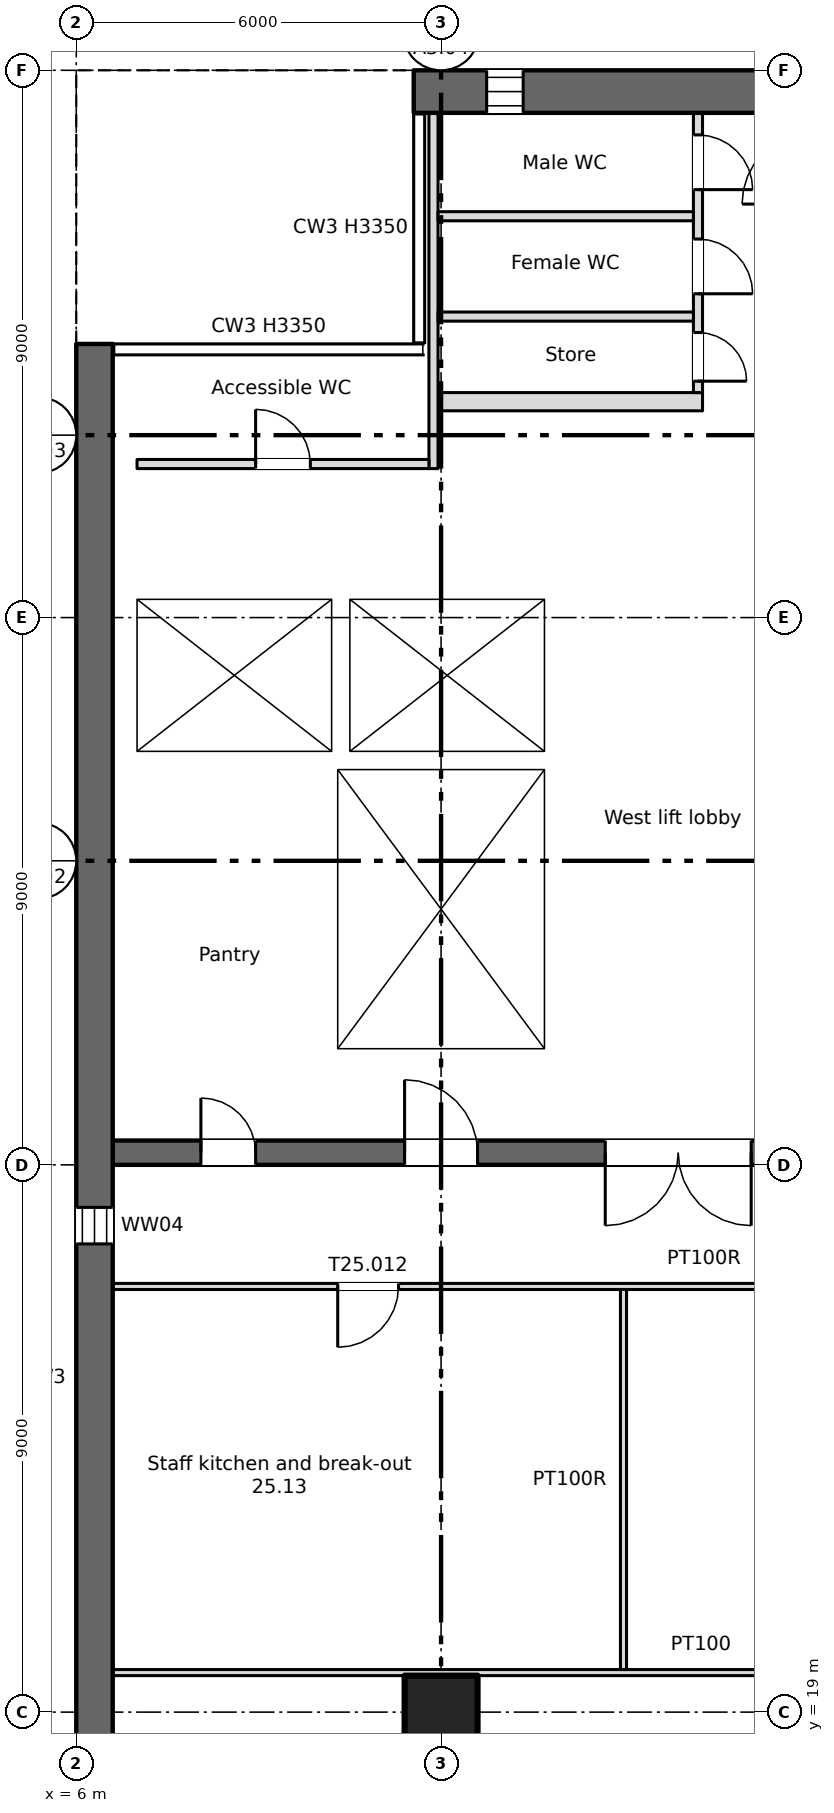
"""IFC4 building model, lengths in metres.
Left out: names, types, materials, properties, quantities, classifications, styles, units other than length and angle.
Written with IfcOpenShell. Run it as: python <this file> out.ifc"""

import sys

from ifc_helpers import new_model, si_unit, direction, frame, frame_2d, origin, origin_2d, place, context, subcontext, project, spatial, rectangle, extrude, element, fill, save


model = new_model("IFC4")
c1 = context("Model", 3, precision=1e-05, world=origin(), true_north=direction((0.0, 1.0)))
c2 = subcontext(c1, "Body", "Model", "MODEL_VIEW")
j1 = project(units=[si_unit("LENGTHUNIT", "METRE"), si_unit("PLANEANGLEUNIT", "RADIAN")], contexts=[c1])
p1 = place(None, origin())
s1 = spatial("IfcSite", under=j1, at=p1, CompositionType="ELEMENT")
p2 = place(p1, origin())
s2 = spatial("IfcBuilding", under=s1, at=p2, CompositionType="ELEMENT")
p3 = place(p2, frame((0.0, 0.0, 170.5)))
s3 = spatial("IfcBuildingStorey", under=s2, at=p3, CompositionType="ELEMENT", Elevation=170.5)
p4 = place(p3, frame((12.0, 19.0, 0.0), z_axis=(0.0, 0.0, 1.0), x_axis=(1.0, 0.0, 0.0)))
e1 = element("IfcColumn", 1, at=p4, inside=s3, PredefinedType="COLUMN", context=c2, shape_type="SweptSolid", body=[
    extrude(rectangle(XDim=1.2, YDim=1.2, at=origin_2d()), origin(), (0.0, 0.0, 1.0), 3.35),
])
p5 = place(p3, frame((6.3, 7.5, 0.0), z_axis=(0.0, 0.0, 1.0), x_axis=(0.0, 1.0, 0.0)))
e2 = element("IfcWall", 2, at=p5, inside=s3, PredefinedType="SHEAR", context=c2, shape_type="SweptSolid", body=[
    extrude(rectangle(XDim=34.0, YDim=0.6, at=frame_2d((17.0, 0.0))), origin(), (0.0, 0.0, 1.0), 3.35),
])
p6 = place(p5, frame((1.2, 0.0, 0.6)))
e3 = element("IfcOpeningElement", 3, at=p6, cuts=e2, PredefinedType="OPENING", context=c2, shape_type="SweptSolid", body=[
    extrude(rectangle(XDim=0.6, YDim=2.4, at=frame_2d((0.3, 1.2))), frame((0.0, 0.31, 0.0), z_axis=(0.0, -1.0, 0.0), x_axis=(1.0, 0.0, 0.0)), (0.0, 0.0, 1.0), 0.62),
])
p7 = place(p5, frame((7.2, 0.0, 0.6)))
e4 = element("IfcOpeningElement", 4, at=p7, cuts=e2, PredefinedType="OPENING", context=c2, shape_type="SweptSolid", body=[
    extrude(rectangle(XDim=0.6, YDim=2.4, at=frame_2d((0.3, 1.2))), frame((0.0, 0.31, 0.0), z_axis=(0.0, -1.0, 0.0), x_axis=(1.0, 0.0, 0.0)), (0.0, 0.0, 1.0), 0.62),
])
p8 = place(p5, frame((19.2, 0.0, 0.6)))
e5 = element("IfcOpeningElement", 5, at=p8, cuts=e2, PredefinedType="OPENING", context=c2, shape_type="SweptSolid", body=[
    extrude(rectangle(XDim=0.6, YDim=2.4, at=frame_2d((0.3, 1.2))), frame((0.0, 0.31, 0.0), z_axis=(0.0, -1.0, 0.0), x_axis=(1.0, 0.0, 0.0)), (0.0, 0.0, 1.0), 0.62),
])
p9 = place(p3, frame((11.55, 45.65, 0.0), z_axis=(0.0, 0.0, 1.0), x_axis=(1.0, 0.0, 0.0)))
e6 = element("IfcWall", 6, at=p9, inside=s3, PredefinedType="SHEAR", context=c2, shape_type="SweptSolid", body=[
    extrude(rectangle(XDim=54.9, YDim=0.7, at=frame_2d((27.45, 0.0))), origin(), (0.0, 0.0, 1.0), 3.35),
])
p10 = place(p9, frame((1.2, 0.0, 0.6)))
e7 = element("IfcOpeningElement", 7, at=p10, cuts=e6, PredefinedType="OPENING", context=c2, shape_type="SweptSolid", body=[
    extrude(rectangle(XDim=0.6, YDim=2.4, at=frame_2d((0.3, 1.2))), frame((0.0, 0.36, 0.0), z_axis=(0.0, -1.0, 0.0), x_axis=(1.0, 0.0, 0.0)), (0.0, 0.0, 1.0), 0.72),
])
p11 = place(p3, frame((6.6, 28.2, 0.0), z_axis=(0.0, 0.0, 1.0), x_axis=(1.0, 0.0, 0.0)))
e8 = element("IfcWall", 8, at=p11, inside=s3, PredefinedType="SHEAR", context=c2, shape_type="SweptSolid", body=[
    extrude(rectangle(XDim=57.9, YDim=0.4, at=frame_2d((28.95, 0.0))), origin(), (0.0, 0.0, 1.0), 3.35),
])
p12 = place(p11, frame((12.163, 0.0, 0.0)))
e9 = element("IfcOpeningElement", 9, at=p12, cuts=e8, PredefinedType="OPENING", context=c2, shape_type="SweptSolid", body=[
    extrude(rectangle(XDim=0.9, YDim=2.1, at=frame_2d((0.45, 1.05))), frame((0.0, 0.21, 0.0), z_axis=(0.0, -1.0, 0.0), x_axis=(1.0, 0.0, 0.0)), (0.0, 0.0, 1.0), 0.42),
])
p13 = place(p11, frame((14.738, 0.0, 0.0)))
e10 = element("IfcOpeningElement", 10, at=p13, cuts=e8, PredefinedType="OPENING", context=c2, shape_type="SweptSolid", body=[
    extrude(rectangle(XDim=0.9, YDim=2.1, at=frame_2d((0.45, 1.05))), frame((0.0, 0.21, 0.0), z_axis=(0.0, -1.0, 0.0), x_axis=(1.0, 0.0, 0.0)), (0.0, 0.0, 1.0), 0.42),
])
p14 = place(p11, frame((49.163, 0.0, 0.0)))
e11 = element("IfcOpeningElement", 11, at=p14, cuts=e8, PredefinedType="OPENING", context=c2, shape_type="SweptSolid", body=[
    extrude(rectangle(XDim=0.9, YDim=2.1, at=frame_2d((0.45, 1.05))), frame((0.0, 0.21, 0.0), z_axis=(0.0, -1.0, 0.0), x_axis=(1.0, 0.0, 0.0)), (0.0, 0.0, 1.0), 0.42),
])
p15 = place(p11, frame((51.738, 0.0, 0.0)))
e12 = element("IfcOpeningElement", 12, at=p15, cuts=e8, PredefinedType="OPENING", context=c2, shape_type="SweptSolid", body=[
    extrude(rectangle(XDim=0.9, YDim=2.1, at=frame_2d((0.45, 1.05))), frame((0.0, 0.21, 0.0), z_axis=(0.0, -1.0, 0.0), x_axis=(1.0, 0.0, 0.0)), (0.0, 0.0, 1.0), 0.42),
])
p16 = place(p11, frame((1.45, 0.0, 0.0)))
e13 = element("IfcOpeningElement", 13, at=p16, cuts=e8, PredefinedType="OPENING", context=c2, shape_type="SweptSolid", body=[
    extrude(rectangle(XDim=0.9, YDim=2.1, at=frame_2d((0.45, 1.05))), frame((0.0, 0.21, 0.0), z_axis=(0.0, -1.0, 0.0), x_axis=(1.0, 0.0, 0.0)), (0.0, 0.0, 1.0), 0.42),
])
p17 = place(p11, frame((4.8, 0.0, 0.0)))
e14 = element("IfcOpeningElement", 14, at=p17, cuts=e8, PredefinedType="OPENING", context=c2, shape_type="SweptSolid", body=[
    extrude(rectangle(XDim=1.2, YDim=2.1, at=frame_2d((0.6, 1.05))), frame((0.0, 0.21, 0.0), z_axis=(0.0, -1.0, 0.0), x_axis=(1.0, 0.0, 0.0)), (0.0, 0.0, 1.0), 0.42),
])
p18 = place(p11, frame((31.8, 0.0, 0.0)))
e15 = element("IfcOpeningElement", 15, at=p18, cuts=e8, PredefinedType="OPENING", context=c2, shape_type="SweptSolid", body=[
    extrude(rectangle(XDim=1.2, YDim=2.1, at=frame_2d((0.6, 1.05))), frame((0.0, 0.21, 0.0), z_axis=(0.0, -1.0, 0.0), x_axis=(1.0, 0.0, 0.0)), (0.0, 0.0, 1.0), 0.42),
])
p19 = place(p11, frame((55.3, 0.0, 0.0)))
e16 = element("IfcOpeningElement", 16, at=p19, cuts=e8, PredefinedType="OPENING", context=c2, shape_type="SweptSolid", body=[
    extrude(rectangle(XDim=1.2, YDim=2.1, at=frame_2d((0.6, 1.05))), frame((0.0, 0.21, 0.0), z_axis=(0.0, -1.0, 0.0), x_axis=(1.0, 0.0, 0.0)), (0.0, 0.0, 1.0), 0.42),
])
p20 = place(p11, frame((21.8, 0.0, 0.0)))
e17 = element("IfcOpeningElement", 17, at=p20, cuts=e8, PredefinedType="OPENING", context=c2, shape_type="SweptSolid", body=[
    extrude(rectangle(XDim=1.2, YDim=2.1, at=frame_2d((0.6, 1.05))), frame((0.0, 0.21, 0.0), z_axis=(0.0, -1.0, 0.0), x_axis=(1.0, 0.0, 0.0)), (0.0, 0.0, 1.0), 0.42),
])
p21 = place(p11, frame((41.8, 0.0, 0.0)))
e18 = element("IfcOpeningElement", 18, at=p21, cuts=e8, PredefinedType="OPENING", context=c2, shape_type="SweptSolid", body=[
    extrude(rectangle(XDim=1.2, YDim=2.1, at=frame_2d((0.6, 1.05))), frame((0.0, 0.21, 0.0), z_axis=(0.0, -1.0, 0.0), x_axis=(1.0, 0.0, 0.0)), (0.0, 0.0, 1.0), 0.42),
])
p22 = place(p11, frame((24.95, 0.0, 0.0)))
e19 = element("IfcOpeningElement", 19, at=p22, cuts=e8, PredefinedType="OPENING", context=c2, shape_type="SweptSolid", body=[
    extrude(rectangle(XDim=2.4, YDim=2.1, at=frame_2d((1.2, 1.05))), frame((0.0, 0.21, 0.0), z_axis=(0.0, -1.0, 0.0), x_axis=(1.0, 0.0, 0.0)), (0.0, 0.0, 1.0), 0.42),
])
p23 = place(p11, frame((37.45, 0.0, 0.0)))
e20 = element("IfcOpeningElement", 20, at=p23, cuts=e8, PredefinedType="OPENING", context=c2, shape_type="SweptSolid", body=[
    extrude(rectangle(XDim=2.4, YDim=2.1, at=frame_2d((1.2, 1.05))), frame((0.0, 0.21, 0.0), z_axis=(0.0, -1.0, 0.0), x_axis=(1.0, 0.0, 0.0)), (0.0, 0.0, 1.0), 0.42),
])
p24 = place(p11, frame((8.1, 0.0, 0.0)))
e21 = element("IfcOpeningElement", 21, at=p24, cuts=e8, PredefinedType="OPENING", context=c2, shape_type="SweptSolid", body=[
    extrude(rectangle(XDim=2.4, YDim=2.1, at=frame_2d((1.2, 1.05))), frame((0.0, 0.21, 0.0), z_axis=(0.0, -1.0, 0.0), x_axis=(1.0, 0.0, 0.0)), (0.0, 0.0, 1.0), 0.42),
])
p25 = place(p11, frame((28.95, 0.0, 0.0)))
e22 = element("IfcOpeningElement", 22, at=p25, cuts=e8, PredefinedType="OPENING", context=c2, shape_type="SweptSolid", body=[
    extrude(rectangle(XDim=0.9, YDim=2.1, at=frame_2d((0.45, 1.05))), frame((0.0, 0.21, 0.0), z_axis=(0.0, -1.0, 0.0), x_axis=(1.0, 0.0, 0.0)), (0.0, 0.0, 1.0), 0.42),
])
p26 = place(p11, frame((34.95, 0.0, 0.0)))
e23 = element("IfcOpeningElement", 23, at=p26, cuts=e8, PredefinedType="OPENING", context=c2, shape_type="SweptSolid", body=[
    extrude(rectangle(XDim=0.9, YDim=2.1, at=frame_2d((0.45, 1.05))), frame((0.0, 0.21, 0.0), z_axis=(0.0, -1.0, 0.0), x_axis=(1.0, 0.0, 0.0)), (0.0, 0.0, 1.0), 0.42),
])
p27 = place(p3, frame((6.8, 28.4, 0.0), z_axis=(0.0, 0.0, 1.0), x_axis=(0.0, 1.0, 0.0)))
e24 = element("IfcWall", 24, at=p27, inside=s3, PredefinedType="SHEAR", context=c2, shape_type="SweptSolid", body=[
    extrude(rectangle(XDim=12.85, YDim=0.4, at=frame_2d((6.425, 0.0))), origin(), (0.0, 0.0, 1.0), 3.35),
])
for number, where, z_axis, x_axis in (
    (25, (10.15, 28.4, 0.0), (0.0, 0.0, 1.0), (0.0, 1.0, 0.0)),
    (26, (13.85, 28.4, 0.0), (0.0, 0.0, 1.0), (0.0, 1.0, 0.0)),
):
    element("IfcWall", number, at=place(p3, frame(where, z_axis=z_axis, x_axis=x_axis)), inside=s3, PredefinedType="SHEAR", context=c2, shape_type="SweptSolid", body=[
        extrude(rectangle(XDim=6.1, YDim=0.3, at=frame_2d((3.05, 0.0))), origin(), (0.0, 0.0, 1.0), 3.35),
    ])
for number, where, z_axis, x_axis in (
    (27, (7.0, 34.65, 0.0), (0.0, 0.0, 1.0), (1.0, 0.0, 0.0)),
    (28, (7.0, 37.45, 0.0), (0.0, 0.0, 1.0), (1.0, 0.0, 0.0)),
):
    element("IfcWall", number, at=place(p3, frame(where, z_axis=z_axis, x_axis=x_axis)), inside=s3, PredefinedType="SHEAR", context=c2, shape_type="SweptSolid", body=[
        extrude(rectangle(XDim=7.0, YDim=0.3, at=frame_2d((3.5, 0.0))), origin(), (0.0, 0.0, 1.0), 3.35),
    ])
p28 = place(p3, frame((13.85, 34.8, 0.0), z_axis=(0.0, 0.0, 1.0), x_axis=(0.0, 1.0, 0.0)))
e29 = element("IfcWall", 29, at=p28, inside=s3, PredefinedType="SHEAR", context=c2, shape_type="SweptSolid", body=[
    extrude(rectangle(XDim=2.5, YDim=0.3, at=frame_2d((1.25, 0.0))), origin(), (0.0, 0.0, 1.0), 3.35),
])
p29 = place(p3, frame((11.95, 40.55, 0.0), z_axis=(0.0, 0.0, 1.0), x_axis=(1.0, 0.0, 0.0)))
e30 = element("IfcWall", 30, at=p29, inside=s3, PredefinedType="PARTITIONING", context=c2, shape_type="SweptSolid", body=[
    extrude(rectangle(XDim=4.35, YDim=0.3, at=frame_2d((2.175, 0.0))), origin(), (0.0, 0.0, 1.0), 3.35),
])
p30 = place(p3, frame((10.35, 34.8, 0.0), z_axis=(0.0, 0.0, 1.0), x_axis=(0.0, 1.0, 0.0)))
e31 = element("IfcWall", 31, at=p30, inside=s3, PredefinedType="SHEAR", context=c2, shape_type="SweptSolid", body=[
    extrude(rectangle(XDim=2.5, YDim=0.3, at=frame_2d((1.25, 0.0))), origin(), (0.0, 0.0, 1.0), 3.35),
])
p31 = place(p3, frame((16.225, 45.3, 0.0), z_axis=(0.0, 0.0, 1.0), x_axis=(0.0, -1.0, 0.0)))
e32 = element("IfcWall", 32, at=p31, inside=s3, PredefinedType="PARTITIONING", context=c2, shape_type="SweptSolid", body=[
    extrude(rectangle(XDim=4.6, YDim=0.15, at=frame_2d((2.3, 0.0))), origin(), (0.0, 0.0, 1.0), 3.35),
])
p32 = place(p31, frame((3.613, 0.0, 0.0)))
e33 = element("IfcOpeningElement", 33, at=p32, cuts=e32, PredefinedType="OPENING", context=c2, shape_type="SweptSolid", body=[
    extrude(rectangle(XDim=0.8, YDim=2.1, at=frame_2d((0.4, 1.05))), frame((0.0, 0.085, 0.0), z_axis=(0.0, -1.0, 0.0), x_axis=(1.0, 0.0, 0.0)), (0.0, 0.0, 1.0), 0.17),
])
p33 = place(p31, frame((2.075, 0.0, 0.0)))
e34 = element("IfcOpeningElement", 34, at=p33, cuts=e32, PredefinedType="OPENING", context=c2, shape_type="SweptSolid", body=[
    extrude(rectangle(XDim=0.9, YDim=2.1, at=frame_2d((0.45, 1.05))), frame((0.0, 0.085, 0.0), z_axis=(0.0, -1.0, 0.0), x_axis=(1.0, 0.0, 0.0)), (0.0, 0.0, 1.0), 0.17),
])
p34 = place(p31, frame((0.363, 0.0, 0.0)))
e35 = element("IfcOpeningElement", 35, at=p34, cuts=e32, PredefinedType="OPENING", context=c2, shape_type="SweptSolid", body=[
    extrude(rectangle(XDim=0.9, YDim=2.1, at=frame_2d((0.45, 1.05))), frame((0.0, 0.085, 0.0), z_axis=(0.0, -1.0, 0.0), x_axis=(1.0, 0.0, 0.0)), (0.0, 0.0, 1.0), 0.17),
])
p35 = place(p3, frame((11.875, 39.45, 0.0), z_axis=(0.0, 0.0, 1.0), x_axis=(0.0, 1.0, 0.0)))
e36 = element("IfcWall", 36, at=p35, inside=s3, PredefinedType="PARTITIONING", context=c2, shape_type="SweptSolid", body=[
    extrude(rectangle(XDim=5.85, YDim=0.15, at=frame_2d((2.925, 0.0))), origin(), (0.0, 0.0, 1.0), 3.35),
])
p36 = place(p3, frame((7.0, 39.525, 0.0), z_axis=(0.0, 0.0, 1.0), x_axis=(1.0, 0.0, 0.0)))
e37 = element("IfcWall", 37, at=p36, inside=s3, PredefinedType="PARTITIONING", context=c2, shape_type="SweptSolid", body=[
    extrude(rectangle(XDim=4.8, YDim=0.15, at=frame_2d((2.4, 0.0))), origin(), (0.0, 0.0, 1.0), 3.35),
])
p37 = place(p36, frame((1.95, 0.0, 0.0)))
e38 = element("IfcOpeningElement", 38, at=p37, cuts=e37, PredefinedType="OPENING", context=c2, shape_type="SweptSolid", body=[
    extrude(rectangle(XDim=0.9, YDim=2.1, at=frame_2d((0.45, 1.05))), frame((0.0, 0.085, 0.0), z_axis=(0.0, -1.0, 0.0), x_axis=(1.0, 0.0, 0.0)), (0.0, 0.0, 1.0), 0.17),
])
for number, where, z_axis, x_axis in (
    (39, (11.95, 41.95, 0.0), (0.0, 0.0, 1.0), (1.0, 0.0, 0.0)),
    (40, (11.95, 43.6, 0.0), (0.0, 0.0, 1.0), (1.0, 0.0, 0.0)),
):
    element("IfcWall", number, at=place(p3, frame(where, z_axis=z_axis, x_axis=x_axis)), inside=s3, PredefinedType="PARTITIONING", context=c2, shape_type="SweptSolid", body=[
        extrude(rectangle(XDim=4.2, YDim=0.15, at=frame_2d((2.1, 0.0))), origin(), (0.0, 0.0, 1.0), 3.35),
    ])
p38 = place(p3, frame((6.6, 19.65, 0.0), z_axis=(0.0, 0.0, 1.0), x_axis=(1.0, 0.0, 0.0)))
e41 = element("IfcWall", 41, at=p38, inside=s3, PredefinedType="PARTITIONING", context=c2, shape_type="SweptSolid", body=[
    extrude(rectangle(XDim=19.35, YDim=0.1, at=frame_2d((9.675, 0.0))), origin(), (0.0, 0.0, 1.0), 3.35),
])
p39 = place(p3, frame((6.6, 26.0, 0.0), z_axis=(0.0, 0.0, 1.0), x_axis=(1.0, 0.0, 0.0)))
e42 = element("IfcWall", 42, at=p39, inside=s3, PredefinedType="PARTITIONING", context=c2, shape_type="SweptSolid", body=[
    extrude(rectangle(XDim=19.45, YDim=0.1, at=frame_2d((9.725, 0.0))), origin(), (0.0, 0.0, 1.0), 3.35),
])
p40 = place(p39, frame((3.7, 0.0, 0.0)))
e43 = element("IfcOpeningElement", 43, at=p40, cuts=e42, PredefinedType="OPENING", context=c2, shape_type="SweptSolid", body=[
    extrude(rectangle(XDim=1.0, YDim=2.1, at=frame_2d((0.5, 1.05))), frame((0.0, 0.06, 0.0), z_axis=(0.0, -1.0, 0.0), x_axis=(1.0, 0.0, 0.0)), (0.0, 0.0, 1.0), 0.12),
])
p41 = place(p39, frame((13.0, 0.0, 0.0)))
e44 = element("IfcOpeningElement", 44, at=p41, cuts=e42, PredefinedType="OPENING", context=c2, shape_type="SweptSolid", body=[
    extrude(rectangle(XDim=1.8, YDim=2.1, at=frame_2d((0.9, 1.05))), frame((0.0, 0.06, 0.0), z_axis=(0.0, -1.0, 0.0), x_axis=(1.0, 0.0, 0.0)), (0.0, 0.0, 1.0), 0.12),
])
p42 = place(p3, frame((15.0, 19.7, 0.0), z_axis=(0.0, 0.0, 1.0), x_axis=(0.0, 1.0, 0.0)))
e45 = element("IfcWall", 45, at=p42, inside=s3, PredefinedType="PARTITIONING", context=c2, shape_type="SweptSolid", body=[
    extrude(rectangle(XDim=6.25, YDim=0.1, at=frame_2d((3.125, 0.0))), origin(), (0.0, 0.0, 1.0), 3.35),
])
p43 = place(p10, origin())
e46 = element("IfcWindow", 46, at=p43, inside=s3, PartitioningType="SINGLE_PANEL", PredefinedType="WINDOW", context=c2, shape_type="SweptSolid", body=[
    extrude(rectangle(XDim=0.6, YDim=2.4, at=frame_2d((0.3, 1.2))), frame((0.0, 0.03, 0.0), z_axis=(0.0, -1.0, 0.0), x_axis=(1.0, 0.0, 0.0)), (0.0, 0.0, 1.0), 0.06),
])
fill(e7, e46)
p44 = place(p8, origin())
e47 = element("IfcWindow", 47, at=p44, inside=s3, PartitioningType="SINGLE_PANEL", PredefinedType="WINDOW", context=c2, shape_type="SweptSolid", body=[
    extrude(rectangle(XDim=0.6, YDim=2.4, at=frame_2d((0.3, 1.2))), frame((0.0, 0.03, 0.0), z_axis=(0.0, -1.0, 0.0), x_axis=(1.0, 0.0, 0.0)), (0.0, 0.0, 1.0), 0.06),
])
fill(e5, e47)
p45 = place(p16, origin())
e48 = element("IfcDoor", 48, at=p45, inside=s3, OperationType="SINGLE_SWING_LEFT", PredefinedType="DOOR", context=c2, shape_type="SweptSolid", body=[
    extrude(rectangle(XDim=0.9, YDim=2.1, at=frame_2d((0.45, 1.05))), frame((0.0, 0.025, 0.0), z_axis=(0.0, -1.0, 0.0), x_axis=(1.0, 0.0, 0.0)), (0.0, 0.0, 1.0), 0.05),
])
fill(e13, e48)
p46 = place(p37, origin())
e49 = element("IfcDoor", 49, at=p46, inside=s3, OperationType="SINGLE_SWING_LEFT", PredefinedType="DOOR", context=c2, shape_type="SweptSolid", body=[
    extrude(rectangle(XDim=0.9, YDim=2.1, at=frame_2d((0.45, 1.05))), frame((0.0, 0.025, 0.0), z_axis=(0.0, -1.0, 0.0), x_axis=(1.0, 0.0, 0.0)), (0.0, 0.0, 1.0), 0.05),
])
fill(e38, e49)
p47 = place(p32, origin())
e50 = element("IfcDoor", 50, at=p47, inside=s3, OperationType="SINGLE_SWING_RIGHT", PredefinedType="DOOR", context=c2, shape_type="SweptSolid", body=[
    extrude(rectangle(XDim=0.8, YDim=2.1, at=frame_2d((0.4, 1.05))), frame((0.0, 0.025, 0.0), z_axis=(0.0, -1.0, 0.0), x_axis=(1.0, 0.0, 0.0)), (0.0, 0.0, 1.0), 0.05),
])
fill(e33, e50)
p48 = place(p33, origin())
e51 = element("IfcDoor", 51, at=p48, inside=s3, OperationType="SINGLE_SWING_RIGHT", PredefinedType="DOOR", context=c2, shape_type="SweptSolid", body=[
    extrude(rectangle(XDim=0.9, YDim=2.1, at=frame_2d((0.45, 1.05))), frame((0.0, 0.025, 0.0), z_axis=(0.0, -1.0, 0.0), x_axis=(1.0, 0.0, 0.0)), (0.0, 0.0, 1.0), 0.05),
])
fill(e34, e51)
p49 = place(p34, origin())
e52 = element("IfcDoor", 52, at=p49, inside=s3, OperationType="SINGLE_SWING_RIGHT", PredefinedType="DOOR", context=c2, shape_type="SweptSolid", body=[
    extrude(rectangle(XDim=0.9, YDim=2.1, at=frame_2d((0.45, 1.05))), frame((0.0, 0.025, 0.0), z_axis=(0.0, -1.0, 0.0), x_axis=(1.0, 0.0, 0.0)), (0.0, 0.0, 1.0), 0.05),
])
fill(e35, e52)
p50 = place(p17, origin())
e53 = element("IfcDoor", 53, at=p50, inside=s3, OperationType="SINGLE_SWING_LEFT", PredefinedType="DOOR", context=c2, shape_type="SweptSolid", body=[
    extrude(rectangle(XDim=1.2, YDim=2.1, at=frame_2d((0.6, 1.05))), frame((0.0, 0.025, 0.0), z_axis=(0.0, -1.0, 0.0), x_axis=(1.0, 0.0, 0.0)), (0.0, 0.0, 1.0), 0.05),
])
fill(e14, e53)
p51 = place(p24, origin())
e54 = element("IfcDoor", 54, at=p51, inside=s3, OperationType="DOUBLE_DOOR_SINGLE_SWING", PredefinedType="DOOR", context=c2, shape_type="SweptSolid", body=[
    extrude(rectangle(XDim=2.4, YDim=2.1, at=frame_2d((1.2, 1.05))), frame((0.0, 0.025, 0.0), z_axis=(0.0, -1.0, 0.0), x_axis=(1.0, 0.0, 0.0)), (0.0, 0.0, 1.0), 0.05),
])
fill(e21, e54)
p52 = place(p40, origin())
e55 = element("IfcDoor", 55, at=p52, inside=s3, OperationType="SINGLE_SWING_LEFT", PredefinedType="DOOR", context=c2, shape_type="SweptSolid", body=[
    extrude(rectangle(XDim=1.0, YDim=2.1, at=frame_2d((0.5, 1.05))), frame((0.0, 0.025, 0.0), z_axis=(0.0, -1.0, 0.0), x_axis=(1.0, 0.0, 0.0)), (0.0, 0.0, 1.0), 0.05),
])
fill(e43, e55)
save(model, sys.argv[1])
